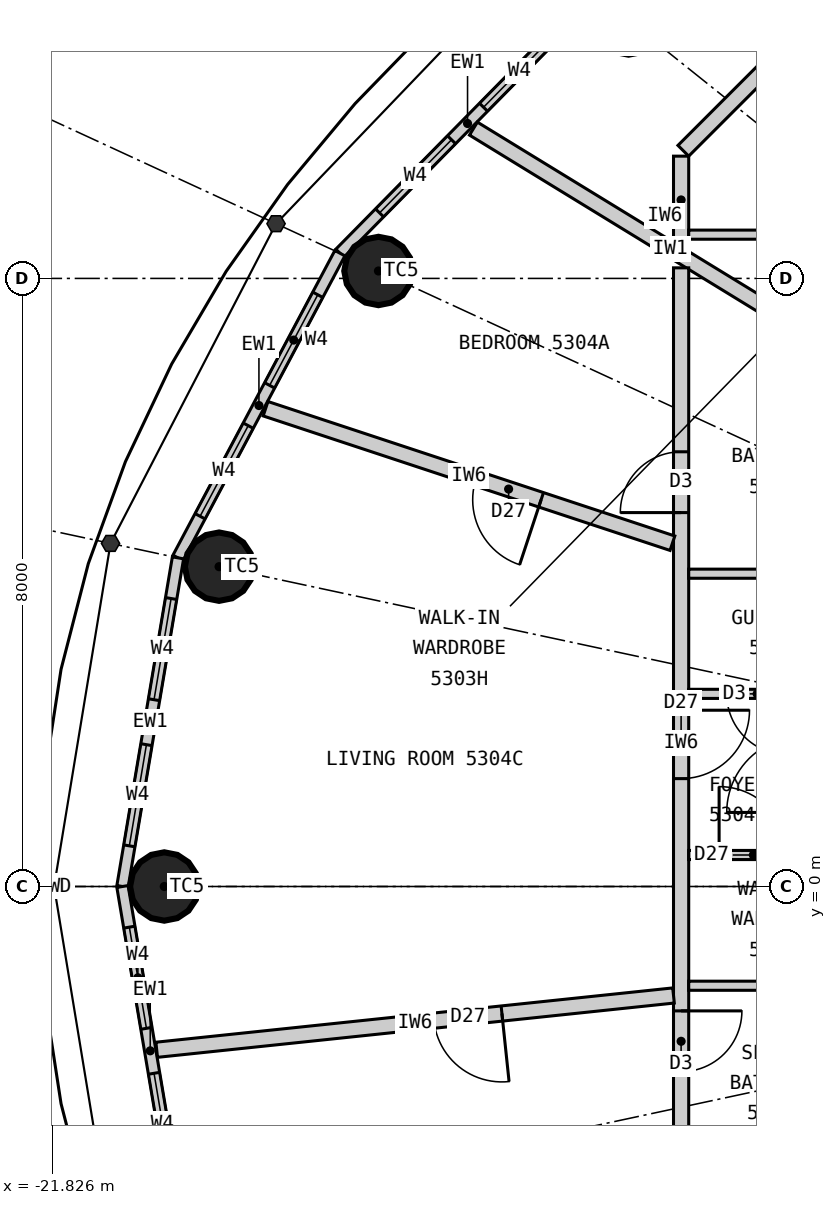
"""IFC4 building model, lengths in metres.
Left out: names, types, materials, properties, quantities, classifications, styles, units other than length and angle.
Written with IfcOpenShell. Run it as: python <this file> out.ifc"""

import sys

from ifc_helpers import new_model, si_unit, direction, frame, frame_2d, origin, origin_2d, place, context, subcontext, project, spatial, rectangle, circle, extrude, element, fill, save


model = new_model("IFC4")
c1 = context("Model", 3, precision=1e-05, world=origin(), true_north=direction((0.0, 1.0)))
c2 = subcontext(c1, "Body", "Model", "MODEL_VIEW")
j1 = project(units=[si_unit("LENGTHUNIT", "METRE"), si_unit("PLANEANGLEUNIT", "RADIAN")], contexts=[c1])
p1 = place(None, origin())
s1 = spatial("IfcSite", under=j1, at=p1, CompositionType="ELEMENT")
p2 = place(p1, origin())
s2 = spatial("IfcBuilding", under=s1, at=p2, CompositionType="ELEMENT")
p3 = place(p2, frame((0.0, 0.0, 199.5)))
s3 = spatial("IfcBuildingStorey", under=s2, at=p3, CompositionType="ELEMENT", Elevation=199.5)
for number, where, z_axis, x_axis in (
    (1, (-14.241, 11.393, 0.0), (0.0, 0.0, 1.0), (1.0, 0.0, 0.0)),
    (2, (-17.532, 8.098, 0.0), (0.0, 0.0, 1.0), (1.0, 0.0, 0.0)),
    (3, (-19.629, 4.208, 0.0), (0.0, 0.0, 1.0), (1.0, 0.0, 0.0)),
    (4, (-20.35, 0.0, 0.0), (0.0, 0.0, 1.0), (1.0, 0.0, 0.0)),
):
    element("IfcColumn", number, at=place(p3, frame(where, z_axis=z_axis, x_axis=x_axis)), inside=s3, PredefinedType="COLUMN", context=c2, shape_type="SweptSolid", body=[
        extrude(circle(Radius=0.45, at=origin_2d()), origin(), (0.0, 0.0, 1.0), 3.3),
    ])
p4 = place(p3, frame((-14.68, 11.744, 0.0), z_axis=(0.0, 0.0, 1.0), x_axis=(-0.701527379618, -0.712642501993, 0.0)))
e5 = element("IfcWall", 5, at=p4, inside=s3, PredefinedType="ELEMENTEDWALL", context=c2, shape_type="SweptSolid", body=[
    extrude(rectangle(XDim=4.788, YDim=0.15, at=frame_2d((2.394, 0.0))), origin(), (0.0, 0.0, 1.0), 3.12),
])
p5 = place(p4, frame((0.744, 0.0, 0.9)))
e6 = element("IfcOpeningElement", 6, at=p5, cuts=e5, PredefinedType="OPENING", context=c2, shape_type="SweptSolid", body=[
    extrude(rectangle(XDim=1.35, YDim=1.9, at=frame_2d((0.675, 0.95))), frame((0.0, 0.085, 0.0), z_axis=(0.0, -1.0, 0.0), x_axis=(1.0, 0.0, 0.0)), (0.0, 0.0, 1.0), 0.17),
])
p6 = place(p4, frame((2.694, 0.0, 0.9)))
e7 = element("IfcOpeningElement", 7, at=p6, cuts=e5, PredefinedType="OPENING", context=c2, shape_type="SweptSolid", body=[
    extrude(rectangle(XDim=1.35, YDim=1.9, at=frame_2d((0.675, 0.95))), frame((0.0, 0.085, 0.0), z_axis=(0.0, -1.0, 0.0), x_axis=(1.0, 0.0, 0.0)), (0.0, 0.0, 1.0), 0.17),
])
p7 = place(p3, frame((-18.04, 8.332, 0.0), z_axis=(0.0, 0.0, 1.0), x_axis=(-0.469256152955, -0.883062094597, 0.0)))
e8 = element("IfcWall", 8, at=p7, inside=s3, PredefinedType="ELEMENTEDWALL", context=c2, shape_type="SweptSolid", body=[
    extrude(rectangle(XDim=4.539, YDim=0.15, at=frame_2d((2.27, 0.0))), origin(), (0.0, 0.0, 1.0), 3.12),
])
p8 = place(p7, frame((0.62, 0.0, 0.9)))
e9 = element("IfcOpeningElement", 9, at=p8, cuts=e8, PredefinedType="OPENING", context=c2, shape_type="SweptSolid", body=[
    extrude(rectangle(XDim=1.35, YDim=1.9, at=frame_2d((0.675, 0.95))), frame((0.0, 0.085, 0.0), z_axis=(0.0, -1.0, 0.0), x_axis=(1.0, 0.0, 0.0)), (0.0, 0.0, 1.0), 0.17),
])
p9 = place(p7, frame((2.57, 0.0, 0.9)))
e10 = element("IfcOpeningElement", 10, at=p9, cuts=e8, PredefinedType="OPENING", context=c2, shape_type="SweptSolid", body=[
    extrude(rectangle(XDim=1.35, YDim=1.9, at=frame_2d((0.675, 0.95))), frame((0.0, 0.085, 0.0), z_axis=(0.0, -1.0, 0.0), x_axis=(1.0, 0.0, 0.0)), (0.0, 0.0, 1.0), 0.17),
])
p10 = place(p3, frame((-20.17, 4.323, 0.0), z_axis=(0.0, 0.0, 1.0), x_axis=(-0.166538513568, -0.986034950445, 0.0)))
e11 = element("IfcWall", 11, at=p10, inside=s3, PredefinedType="ELEMENTEDWALL", context=c2, shape_type="SweptSolid", body=[
    extrude(rectangle(XDim=4.385, YDim=0.15, at=frame_2d((2.192, 0.0))), origin(), (0.0, 0.0, 1.0), 3.12),
])
p11 = place(p10, frame((0.542, 0.0, 0.9)))
e12 = element("IfcOpeningElement", 12, at=p11, cuts=e11, PredefinedType="OPENING", context=c2, shape_type="SweptSolid", body=[
    extrude(rectangle(XDim=1.35, YDim=1.9, at=frame_2d((0.675, 0.95))), frame((0.0, 0.085, 0.0), z_axis=(0.0, -1.0, 0.0), x_axis=(1.0, 0.0, 0.0)), (0.0, 0.0, 1.0), 0.17),
])
p12 = place(p10, frame((2.492, 0.0, 0.9)))
e13 = element("IfcOpeningElement", 13, at=p12, cuts=e11, PredefinedType="OPENING", context=c2, shape_type="SweptSolid", body=[
    extrude(rectangle(XDim=1.35, YDim=1.9, at=frame_2d((0.675, 0.95))), frame((0.0, 0.085, 0.0), z_axis=(0.0, -1.0, 0.0), x_axis=(1.0, 0.0, 0.0)), (0.0, 0.0, 1.0), 0.17),
])
p13 = place(p3, frame((-20.9, 0.0, 0.0), z_axis=(0.0, 0.0, 1.0), x_axis=(0.166538513568, -0.986034950445, 0.0)))
e14 = element("IfcWall", 14, at=p13, inside=s3, PredefinedType="ELEMENTEDWALL", context=c2, shape_type="SweptSolid", body=[
    extrude(rectangle(XDim=4.385, YDim=0.15, at=frame_2d((2.192, 0.0))), origin(), (0.0, 0.0, 1.0), 3.12),
])
p14 = place(p13, frame((0.542, 0.0, 0.9)))
e15 = element("IfcOpeningElement", 15, at=p14, cuts=e14, PredefinedType="OPENING", context=c2, shape_type="SweptSolid", body=[
    extrude(rectangle(XDim=1.35, YDim=1.9, at=frame_2d((0.675, 0.95))), frame((0.0, 0.085, 0.0), z_axis=(0.0, -1.0, 0.0), x_axis=(1.0, 0.0, 0.0)), (0.0, 0.0, 1.0), 0.17),
])
p15 = place(p13, frame((2.492, 0.0, 0.9)))
e16 = element("IfcOpeningElement", 16, at=p15, cuts=e14, PredefinedType="OPENING", context=c2, shape_type="SweptSolid", body=[
    extrude(rectangle(XDim=1.35, YDim=1.9, at=frame_2d((0.675, 0.95))), frame((0.0, 0.085, 0.0), z_axis=(0.0, -1.0, 0.0), x_axis=(1.0, 0.0, 0.0)), (0.0, 0.0, 1.0), 0.17),
])
p16 = place(p3, frame((-11.1, 6.797, 0.0), z_axis=(0.0, 0.0, 1.0), x_axis=(-0.852799818179, 0.522237943963, 0.0)))
e17 = element("IfcWall", 17, at=p16, inside=s3, PredefinedType="PARTITIONING", context=c2, shape_type="SweptSolid", body=[
    extrude(rectangle(XDim=6.077, YDim=0.2, at=frame_2d((3.039, 0.0))), origin(), (0.0, 0.0, 1.0), 3.12),
])
p17 = place(p3, frame((-10.679, 12.521, 0.0), z_axis=(0.0, 0.0, 1.0), x_axis=(-0.707106781187, -0.707106781187, 0.0)))
e18 = element("IfcWall", 18, at=p17, inside=s3, PredefinedType="PARTITIONING", context=c2, shape_type="SweptSolid", body=[
    extrude(rectangle(XDim=4.019, YDim=0.2, at=frame_2d((2.009, 0.0))), origin(), (0.0, 0.0, 1.0), 3.12),
])
p18 = place(p3, frame((-13.55, 9.609, 0.0), z_axis=(0.0, 0.0, 1.0), x_axis=(0.0, -1.0, 0.0)))
e19 = element("IfcWall", 19, at=p18, inside=s3, PredefinedType="PARTITIONING", context=c2, shape_type="SweptSolid", body=[
    extrude(rectangle(XDim=1.153, YDim=0.2, at=frame_2d((0.576, 0.0))), origin(), (0.0, 0.0, 1.0), 3.12),
])
p19 = place(p3, frame((-11.1, 8.576, 0.0), z_axis=(0.0, 0.0, 1.0), x_axis=(-1.0, 0.0, 0.0)))
e20 = element("IfcWall", 20, at=p19, inside=s3, PredefinedType="PARTITIONING", context=c2, shape_type="SweptSolid", body=[
    extrude(rectangle(XDim=2.35, YDim=0.12, at=frame_2d((1.175, 0.0))), origin(), (0.0, 0.0, 1.0), 3.12),
])
p20 = place(p19, frame((0.22, 0.0, 0.0)))
e21 = element("IfcOpeningElement", 21, at=p20, cuts=e20, PredefinedType="OPENING", context=c2, shape_type="SweptSolid", body=[
    extrude(rectangle(XDim=0.9, YDim=2.1, at=frame_2d((0.45, 1.05))), frame((0.0, 0.07, 0.0), z_axis=(0.0, -1.0, 0.0), x_axis=(1.0, 0.0, 0.0)), (0.0, 0.0, 1.0), 0.14),
])
p21 = place(p3, frame((-13.55, 8.139, 0.0), z_axis=(0.0, 0.0, 1.0), x_axis=(0.0, -1.0, 0.0)))
e22 = element("IfcWall", 22, at=p21, inside=s3, PredefinedType="PARTITIONING", context=c2, shape_type="SweptSolid", body=[
    extrude(rectangle(XDim=12.496, YDim=0.2, at=frame_2d((6.248, 0.0))), origin(), (0.0, 0.0, 1.0), 3.12),
])
p22 = place(p21, frame((2.42, 0.0, 0.0)))
e23 = element("IfcOpeningElement", 23, at=p22, cuts=e22, PredefinedType="OPENING", context=c2, shape_type="SweptSolid", body=[
    extrude(rectangle(XDim=0.8, YDim=2.1, at=frame_2d((0.4, 1.05))), frame((0.0, 0.11, 0.0), z_axis=(0.0, -1.0, 0.0), x_axis=(1.0, 0.0, 0.0)), (0.0, 0.0, 1.0), 0.22),
])
p23 = place(p21, frame((9.776, 0.0, 0.0)))
e24 = element("IfcOpeningElement", 24, at=p23, cuts=e22, PredefinedType="OPENING", context=c2, shape_type="SweptSolid", body=[
    extrude(rectangle(XDim=0.8, YDim=2.1, at=frame_2d((0.4, 1.05))), frame((0.0, 0.11, 0.0), z_axis=(0.0, -1.0, 0.0), x_axis=(1.0, 0.0, 0.0)), (0.0, 0.0, 1.0), 0.22),
])
p24 = place(p21, frame((5.82, 0.0, 0.0)))
e25 = element("IfcOpeningElement", 25, at=p24, cuts=e22, PredefinedType="OPENING", context=c2, shape_type="SweptSolid", body=[
    extrude(rectangle(XDim=0.9, YDim=2.1, at=frame_2d((0.45, 1.05))), frame((0.0, 0.11, 0.0), z_axis=(0.0, -1.0, 0.0), x_axis=(1.0, 0.0, 0.0)), (0.0, 0.0, 1.0), 0.22),
])
p25 = place(p3, frame((-13.664, 4.516, 0.0), z_axis=(0.0, 0.0, 1.0), x_axis=(-0.949481375941, 0.313823384632, 0.0)))
e26 = element("IfcWall", 26, at=p25, inside=s3, PredefinedType="PARTITIONING", context=c2, shape_type="SweptSolid", body=[
    extrude(rectangle(XDim=5.638, YDim=0.2, at=frame_2d((2.819, 0.0))), origin(), (0.0, 0.0, 1.0), 3.12),
])
p26 = place(p25, frame((1.82, 0.0, 0.0)))
e27 = element("IfcOpeningElement", 27, at=p26, cuts=e26, PredefinedType="OPENING", context=c2, shape_type="SweptSolid", body=[
    extrude(rectangle(XDim=0.9, YDim=2.1, at=frame_2d((0.45, 1.05))), frame((0.0, 0.11, 0.0), z_axis=(0.0, -1.0, 0.0), x_axis=(1.0, 0.0, 0.0)), (0.0, 0.0, 1.0), 0.22),
])
p27 = place(p3, frame((-13.65, -1.434, 0.0), z_axis=(0.0, 0.0, 1.0), x_axis=(-0.994526954268, -0.10448031984, 0.0)))
e28 = element("IfcWall", 28, at=p27, inside=s3, PredefinedType="PARTITIONING", context=c2, shape_type="SweptSolid", body=[
    extrude(rectangle(XDim=6.837, YDim=0.2, at=frame_2d((3.418, 0.0))), origin(), (0.0, 0.0, 1.0), 2.47),
])
p28 = place(p27, frame((2.27, 0.0, 0.0)))
e29 = element("IfcOpeningElement", 29, at=p28, cuts=e28, PredefinedType="OPENING", context=c2, shape_type="SweptSolid", body=[
    extrude(rectangle(XDim=0.9, YDim=2.1, at=frame_2d((0.45, 1.05))), frame((0.0, 0.11, 0.0), z_axis=(0.0, -1.0, 0.0), x_axis=(1.0, 0.0, 0.0)), (0.0, 0.0, 1.0), 0.22),
])
p29 = place(p3, frame((-11.1, 4.115, 0.0), z_axis=(0.0, 0.0, 1.0), x_axis=(-1.0, 0.0, 0.0)))
e30 = element("IfcWall", 30, at=p29, inside=s3, PredefinedType="PARTITIONING", context=c2, shape_type="SweptSolid", body=[
    extrude(rectangle(XDim=2.35, YDim=0.12, at=frame_2d((1.175, 0.0))), origin(), (0.0, 0.0, 1.0), 3.12),
])
p30 = place(p3, frame((-11.1, 2.534, 0.0), z_axis=(0.0, 0.0, 1.0), x_axis=(-1.0, 0.0, 0.0)))
e31 = element("IfcWall", 31, at=p30, inside=s3, PredefinedType="PARTITIONING", context=c2, shape_type="SweptSolid", body=[
    extrude(rectangle(XDim=2.35, YDim=0.12, at=frame_2d((1.175, 0.0))), origin(), (0.0, 0.0, 1.0), 3.12),
])
p31 = place(p30, frame((1.05, 0.0, 0.0)))
e32 = element("IfcOpeningElement", 32, at=p31, cuts=e31, PredefinedType="OPENING", context=c2, shape_type="SweptSolid", body=[
    extrude(rectangle(XDim=0.8, YDim=2.1, at=frame_2d((0.4, 1.05))), frame((0.0, 0.07, 0.0), z_axis=(0.0, -1.0, 0.0), x_axis=(1.0, 0.0, 0.0)), (0.0, 0.0, 1.0), 0.14),
])
p32 = place(p3, frame((-11.1, 0.414, 0.0), z_axis=(0.0, 0.0, 1.0), x_axis=(-1.0, 0.0, 0.0)))
e33 = element("IfcWall", 33, at=p32, inside=s3, PredefinedType="PARTITIONING", context=c2, shape_type="SweptSolid", body=[
    extrude(rectangle(XDim=2.35, YDim=0.12, at=frame_2d((1.175, 0.0))), origin(), (0.0, 0.0, 1.0), 3.12),
])
p33 = place(p32, frame((1.05, 0.0, 0.0)))
e34 = element("IfcOpeningElement", 34, at=p33, cuts=e33, PredefinedType="OPENING", context=c2, shape_type="SweptSolid", body=[
    extrude(rectangle(XDim=0.9, YDim=2.1, at=frame_2d((0.45, 1.05))), frame((0.0, 0.07, 0.0), z_axis=(0.0, -1.0, 0.0), x_axis=(1.0, 0.0, 0.0)), (0.0, 0.0, 1.0), 0.14),
])
p34 = place(p3, frame((-11.1, -1.306, 0.0), z_axis=(0.0, 0.0, 1.0), x_axis=(-1.0, 0.0, 0.0)))
e35 = element("IfcWall", 35, at=p34, inside=s3, PredefinedType="PARTITIONING", context=c2, shape_type="SweptSolid", body=[
    extrude(rectangle(XDim=2.35, YDim=0.12, at=frame_2d((1.175, 0.0))), origin(), (0.0, 0.0, 1.0), 3.12),
])
p35 = place(p5, origin())
e36 = element("IfcWindow", 36, at=p35, inside=s3, PartitioningType="SINGLE_PANEL", PredefinedType="WINDOW", context=c2, shape_type="SweptSolid", body=[
    extrude(rectangle(XDim=1.35, YDim=1.9, at=frame_2d((0.675, 0.95))), frame((0.0, 0.03, 0.0), z_axis=(0.0, -1.0, 0.0), x_axis=(1.0, 0.0, 0.0)), (0.0, 0.0, 1.0), 0.06),
])
fill(e6, e36)
p36 = place(p6, origin())
e37 = element("IfcWindow", 37, at=p36, inside=s3, PartitioningType="SINGLE_PANEL", PredefinedType="WINDOW", context=c2, shape_type="SweptSolid", body=[
    extrude(rectangle(XDim=1.35, YDim=1.9, at=frame_2d((0.675, 0.95))), frame((0.0, 0.03, 0.0), z_axis=(0.0, -1.0, 0.0), x_axis=(1.0, 0.0, 0.0)), (0.0, 0.0, 1.0), 0.06),
])
fill(e7, e37)
p37 = place(p8, origin())
e38 = element("IfcWindow", 38, at=p37, inside=s3, PartitioningType="SINGLE_PANEL", PredefinedType="WINDOW", context=c2, shape_type="SweptSolid", body=[
    extrude(rectangle(XDim=1.35, YDim=1.9, at=frame_2d((0.675, 0.95))), frame((0.0, 0.03, 0.0), z_axis=(0.0, -1.0, 0.0), x_axis=(1.0, 0.0, 0.0)), (0.0, 0.0, 1.0), 0.06),
])
fill(e9, e38)
p38 = place(p9, origin())
e39 = element("IfcWindow", 39, at=p38, inside=s3, PartitioningType="SINGLE_PANEL", PredefinedType="WINDOW", context=c2, shape_type="SweptSolid", body=[
    extrude(rectangle(XDim=1.35, YDim=1.9, at=frame_2d((0.675, 0.95))), frame((0.0, 0.03, 0.0), z_axis=(0.0, -1.0, 0.0), x_axis=(1.0, 0.0, 0.0)), (0.0, 0.0, 1.0), 0.06),
])
fill(e10, e39)
p39 = place(p11, origin())
e40 = element("IfcWindow", 40, at=p39, inside=s3, PartitioningType="SINGLE_PANEL", PredefinedType="WINDOW", context=c2, shape_type="SweptSolid", body=[
    extrude(rectangle(XDim=1.35, YDim=1.9, at=frame_2d((0.675, 0.95))), frame((0.0, 0.03, 0.0), z_axis=(0.0, -1.0, 0.0), x_axis=(1.0, 0.0, 0.0)), (0.0, 0.0, 1.0), 0.06),
])
fill(e12, e40)
p40 = place(p12, origin())
e41 = element("IfcWindow", 41, at=p40, inside=s3, PartitioningType="SINGLE_PANEL", PredefinedType="WINDOW", context=c2, shape_type="SweptSolid", body=[
    extrude(rectangle(XDim=1.35, YDim=1.9, at=frame_2d((0.675, 0.95))), frame((0.0, 0.03, 0.0), z_axis=(0.0, -1.0, 0.0), x_axis=(1.0, 0.0, 0.0)), (0.0, 0.0, 1.0), 0.06),
])
fill(e13, e41)
p41 = place(p14, origin())
e42 = element("IfcWindow", 42, at=p41, inside=s3, PartitioningType="SINGLE_PANEL", PredefinedType="WINDOW", context=c2, shape_type="SweptSolid", body=[
    extrude(rectangle(XDim=1.35, YDim=1.9, at=frame_2d((0.675, 0.95))), frame((0.0, 0.03, 0.0), z_axis=(0.0, -1.0, 0.0), x_axis=(1.0, 0.0, 0.0)), (0.0, 0.0, 1.0), 0.06),
])
fill(e15, e42)
p42 = place(p15, origin())
e43 = element("IfcWindow", 43, at=p42, inside=s3, PartitioningType="SINGLE_PANEL", PredefinedType="WINDOW", context=c2, shape_type="SweptSolid", body=[
    extrude(rectangle(XDim=1.35, YDim=1.9, at=frame_2d((0.675, 0.95))), frame((0.0, 0.03, 0.0), z_axis=(0.0, -1.0, 0.0), x_axis=(1.0, 0.0, 0.0)), (0.0, 0.0, 1.0), 0.06),
])
fill(e16, e43)
p43 = place(p22, origin())
e44 = element("IfcDoor", 44, at=p43, inside=s3, OperationType="SINGLE_SWING_RIGHT", PredefinedType="DOOR", context=c2, shape_type="SweptSolid", body=[
    extrude(rectangle(XDim=0.8, YDim=2.1, at=frame_2d((0.4, 1.05))), frame((0.0, 0.025, 0.0), z_axis=(0.0, -1.0, 0.0), x_axis=(1.0, 0.0, 0.0)), (0.0, 0.0, 1.0), 0.05),
])
fill(e23, e44)
p44 = place(p31, origin())
e45 = element("IfcDoor", 45, at=p44, inside=s3, OperationType="SINGLE_SWING_LEFT", PredefinedType="DOOR", context=c2, shape_type="SweptSolid", body=[
    extrude(rectangle(XDim=0.8, YDim=2.1, at=frame_2d((0.4, 1.05))), frame((0.0, 0.025, 0.0), z_axis=(0.0, -1.0, 0.0), x_axis=(1.0, 0.0, 0.0)), (0.0, 0.0, 1.0), 0.05),
])
fill(e32, e45)
p45 = place(p33, origin())
e46 = element("IfcDoor", 46, at=p45, inside=s3, OperationType="SINGLE_SWING_RIGHT", PredefinedType="DOOR", context=c2, shape_type="SweptSolid", body=[
    extrude(rectangle(XDim=0.9, YDim=2.1, at=frame_2d((0.45, 1.05))), frame((0.0, 0.025, 0.0), z_axis=(0.0, -1.0, 0.0), x_axis=(1.0, 0.0, 0.0)), (0.0, 0.0, 1.0), 0.05),
])
fill(e34, e46)
p46 = place(p23, origin())
e47 = element("IfcDoor", 47, at=p46, inside=s3, OperationType="SINGLE_SWING_LEFT", PredefinedType="DOOR", context=c2, shape_type="SweptSolid", body=[
    extrude(rectangle(XDim=0.8, YDim=2.1, at=frame_2d((0.4, 1.05))), frame((0.0, 0.025, 0.0), z_axis=(0.0, -1.0, 0.0), x_axis=(1.0, 0.0, 0.0)), (0.0, 0.0, 1.0), 0.05),
])
fill(e24, e47)
p47 = place(p24, origin())
e48 = element("IfcDoor", 48, at=p47, inside=s3, OperationType="SINGLE_SWING_LEFT", PredefinedType="DOOR", context=c2, shape_type="SweptSolid", body=[
    extrude(rectangle(XDim=0.9, YDim=2.1, at=frame_2d((0.45, 1.05))), frame((0.0, 0.025, 0.0), z_axis=(0.0, -1.0, 0.0), x_axis=(1.0, 0.0, 0.0)), (0.0, 0.0, 1.0), 0.05),
])
fill(e25, e48)
p48 = place(p26, origin())
e49 = element("IfcDoor", 49, at=p48, inside=s3, OperationType="SINGLE_SWING_LEFT", PredefinedType="DOOR", context=c2, shape_type="SweptSolid", body=[
    extrude(rectangle(XDim=0.9, YDim=2.1, at=frame_2d((0.45, 1.05))), frame((0.0, 0.025, 0.0), z_axis=(0.0, -1.0, 0.0), x_axis=(1.0, 0.0, 0.0)), (0.0, 0.0, 1.0), 0.05),
])
fill(e27, e49)
p49 = place(p28, origin())
e50 = element("IfcDoor", 50, at=p49, inside=s3, OperationType="SINGLE_SWING_LEFT", PredefinedType="DOOR", context=c2, shape_type="SweptSolid", body=[
    extrude(rectangle(XDim=0.9, YDim=2.1, at=frame_2d((0.45, 1.05))), frame((0.0, 0.025, 0.0), z_axis=(0.0, -1.0, 0.0), x_axis=(1.0, 0.0, 0.0)), (0.0, 0.0, 1.0), 0.05),
])
fill(e29, e50)
save(model, sys.argv[1])
